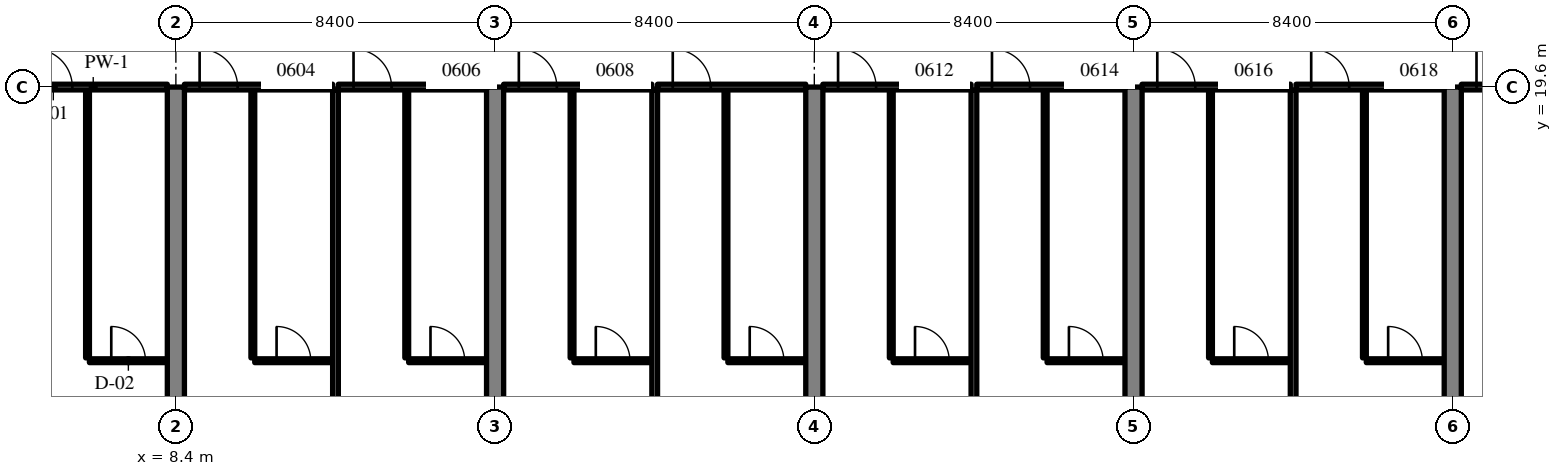
"""IFC4 building model, lengths in metres.
Left out: names, types, materials, properties, quantities, classifications, styles, units other than length and angle.
Written with IfcOpenShell. Run it as: python <this file> out.ifc"""

import sys

from ifc_helpers import new_model, si_unit, direction, frame, frame_2d, origin, place, context, subcontext, project, spatial, rectangle, extrude, source, transform, mapped, element, fill, save


model = new_model("IFC4")
c1 = context("Model", 3, precision=1e-05, world=origin(), true_north=direction((0.0, 1.0)))
c2 = subcontext(c1, "Body", "Model", "MODEL_VIEW")
j1 = project(units=[si_unit("LENGTHUNIT", "METRE"), si_unit("PLANEANGLEUNIT", "RADIAN")], contexts=[c1])
p1 = place(None, origin())
s1 = spatial("IfcSite", under=j1, at=p1, CompositionType="ELEMENT")
p2 = place(p1, origin())
s2 = spatial("IfcBuilding", under=s1, at=p2, CompositionType="ELEMENT")
p3 = place(p2, frame((0.0, 0.0, 31.6)))
s3 = spatial("IfcBuildingStorey", under=s2, at=p3, CompositionType="ELEMENT", Elevation=31.6)
m1 = source(origin(), c2, "Body", "SweptSolid", [
    extrude(rectangle(XDim=19.6, YDim=0.45, at=frame_2d((9.8, 0.0))), origin(), (0.0, 0.0, 1.0), 3.52),
])
for number, where, z_axis, x_axis in (
    (1, (8.4, 0.0, 0.0), (0.0, 0.0, 1.0), (0.0, 1.0, 0.0)),
    (2, (16.8, 0.0, 0.0), (0.0, 0.0, 1.0), (0.0, 1.0, 0.0)),
    (3, (25.2, 0.0, 0.0), (0.0, 0.0, 1.0), (0.0, 1.0, 0.0)),
    (4, (33.6, 0.0, 0.0), (0.0, 0.0, 1.0), (0.0, 1.0, 0.0)),
    (5, (42.0, 0.0, 0.0), (0.0, 0.0, 1.0), (0.0, 1.0, 0.0)),
):
    element("IfcWall", number, at=place(p3, frame(where, z_axis=z_axis, x_axis=x_axis)), inside=s3, PredefinedType="SHEAR", context=c2, shape_type="MappedRepresentation", body=[
        mapped(m1, transform((0.0, 0.0, 0.0), scale=1.0)),
    ])
m2 = source(origin(), c2, "Body", "SweptSolid", [
    extrude(rectangle(XDim=7.05, YDim=0.1, at=frame_2d((3.525, 0.0))), origin(), (0.0, 0.0, 1.0), 3.52),
])
p4 = place(p3, frame((6.075, 12.475, 0.0), z_axis=(0.0, 0.0, 1.0), x_axis=(0.0, 1.0, 0.0)))
e6 = element("IfcWall", 6, at=p4, inside=s3, PredefinedType="PARTITIONING", context=c2, shape_type="MappedRepresentation", body=[
    mapped(m2, transform((0.0, 0.0, 0.0), scale=1.0)),
])
m3 = source(origin(), c2, "Body", "SweptSolid", [
    extrude(rectangle(XDim=2.05, YDim=0.1, at=frame_2d((1.025, 0.0))), origin(), (0.0, 0.0, 1.0), 3.52),
])
p5 = place(p3, frame((6.125, 12.4, 0.0), z_axis=(0.0, 0.0, 1.0), x_axis=(1.0, 0.0, 0.0)))
e7 = element("IfcWall", 7, at=p5, inside=s3, PredefinedType="PARTITIONING", context=c2, shape_type="MappedRepresentation", body=[
    mapped(m3, transform((0.0, 0.0, 0.0), scale=1.0)),
])
m4 = source(origin(), c2, "Body", "SweptSolid", [
    extrude(rectangle(XDim=0.9, YDim=2.1, at=frame_2d((0.45, 1.05))), frame((0.0, 0.06, 0.0), z_axis=(0.0, -1.0, 0.0), x_axis=(1.0, 0.0, 0.0)), (0.0, 0.0, 1.0), 0.12),
])
p6 = place(p5, frame((0.575, 0.0, 0.0)))
e8 = element("IfcOpeningElement", 8, at=p6, cuts=e7, PredefinedType="OPENING", context=c2, shape_type="MappedRepresentation", body=[
    mapped(m4, transform((0.0, 0.0, 0.0), scale=1.0)),
])
m5 = source(origin(), c2, "Body", "SweptSolid", [
    extrude(rectangle(XDim=3.9, YDim=0.15, at=frame_2d((1.95, 0.0))), origin(), (0.0, 0.0, 1.0), 2.82),
])
p7 = place(p3, frame((4.275, 19.6, 0.0), z_axis=(0.0, 0.0, 1.0), x_axis=(1.0, 0.0, 0.0)))
e9 = element("IfcWall", 9, at=p7, inside=s3, PredefinedType="PARTITIONING", context=c2, shape_type="MappedRepresentation", body=[
    mapped(m5, transform((0.0, 0.0, 0.0), scale=1.0)),
])
m6 = source(origin(), c2, "Body", "SweptSolid", [
    extrude(rectangle(XDim=1.0, YDim=2.1, at=frame_2d((0.5, 1.05))), frame((0.0, 0.085, 0.0), z_axis=(0.0, -1.0, 0.0), x_axis=(1.0, 0.0, 0.0)), (0.0, 0.0, 1.0), 0.17),
])
p8 = place(p7, frame((0.4, 0.0, 0.0)))
e10 = element("IfcOpeningElement", 10, at=p8, cuts=e9, PredefinedType="OPENING", context=c2, shape_type="MappedRepresentation", body=[
    mapped(m6, transform((0.0, 0.0, 0.0), scale=1.0)),
])
p9 = place(p3, frame((10.425, 12.475, 0.0), z_axis=(0.0, 0.0, 1.0), x_axis=(0.0, 1.0, 0.0)))
e11 = element("IfcWall", 11, at=p9, inside=s3, PredefinedType="PARTITIONING", context=c2, shape_type="MappedRepresentation", body=[
    mapped(m2, transform((0.0, 0.0, 0.0), scale=1.0)),
])
m7 = source(origin(), c2, "Body", "SweptSolid", [
    extrude(rectangle(XDim=2.05, YDim=0.1, at=frame_2d((1.025, 0.0))), origin(), (0.0, 0.0, 1.0), 3.52),
])
p10 = place(p3, frame((10.475, 12.4, 0.0), z_axis=(0.0, 0.0, 1.0), x_axis=(1.0, 0.0, 0.0)))
e12 = element("IfcWall", 12, at=p10, inside=s3, PredefinedType="PARTITIONING", context=c2, shape_type="MappedRepresentation", body=[
    mapped(m7, transform((0.0, 0.0, 0.0), scale=1.0)),
])
p11 = place(p10, frame((0.575, 0.0, 0.0)))
e13 = element("IfcOpeningElement", 13, at=p11, cuts=e12, PredefinedType="OPENING", context=c2, shape_type="MappedRepresentation", body=[
    mapped(m4, transform((0.0, 0.0, 0.0), scale=1.0)),
])
m8 = source(origin(), c2, "Body", "SweptSolid", [
    extrude(rectangle(XDim=3.9, YDim=0.15, at=frame_2d((1.95, 0.0))), origin(), (0.0, 0.0, 1.0), 2.82),
])
p12 = place(p3, frame((8.625, 19.6, 0.0), z_axis=(0.0, 0.0, 1.0), x_axis=(1.0, 0.0, 0.0)))
e14 = element("IfcWall", 14, at=p12, inside=s3, PredefinedType="PARTITIONING", context=c2, shape_type="MappedRepresentation", body=[
    mapped(m8, transform((0.0, 0.0, 0.0), scale=1.0)),
])
p13 = place(p12, frame((0.4, 0.0, 0.0)))
e15 = element("IfcOpeningElement", 15, at=p13, cuts=e14, PredefinedType="OPENING", context=c2, shape_type="MappedRepresentation", body=[
    mapped(m6, transform((0.0, 0.0, 0.0), scale=1.0)),
])
p14 = place(p3, frame((14.475, 12.475, 0.0), z_axis=(0.0, 0.0, 1.0), x_axis=(0.0, 1.0, 0.0)))
e16 = element("IfcWall", 16, at=p14, inside=s3, PredefinedType="PARTITIONING", context=c2, shape_type="MappedRepresentation", body=[
    mapped(m2, transform((0.0, 0.0, 0.0), scale=1.0)),
])
p15 = place(p3, frame((14.525, 12.4, 0.0), z_axis=(0.0, 0.0, 1.0), x_axis=(1.0, 0.0, 0.0)))
e17 = element("IfcWall", 17, at=p15, inside=s3, PredefinedType="PARTITIONING", context=c2, shape_type="MappedRepresentation", body=[
    mapped(m3, transform((0.0, 0.0, 0.0), scale=1.0)),
])
p16 = place(p15, frame((0.575, 0.0, 0.0)))
e18 = element("IfcOpeningElement", 18, at=p16, cuts=e17, PredefinedType="OPENING", context=c2, shape_type="MappedRepresentation", body=[
    mapped(m4, transform((0.0, 0.0, 0.0), scale=1.0)),
])
p17 = place(p3, frame((12.675, 19.6, 0.0), z_axis=(0.0, 0.0, 1.0), x_axis=(1.0, 0.0, 0.0)))
e19 = element("IfcWall", 19, at=p17, inside=s3, PredefinedType="PARTITIONING", context=c2, shape_type="MappedRepresentation", body=[
    mapped(m8, transform((0.0, 0.0, 0.0), scale=1.0)),
])
p18 = place(p17, frame((0.4, 0.0, 0.0)))
e20 = element("IfcOpeningElement", 20, at=p18, cuts=e19, PredefinedType="OPENING", context=c2, shape_type="MappedRepresentation", body=[
    mapped(m6, transform((0.0, 0.0, 0.0), scale=1.0)),
])
m9 = source(origin(), c2, "Body", "SweptSolid", [
    extrude(rectangle(XDim=18.625, YDim=0.15, at=frame_2d((9.312, 0.0))), origin(), (0.0, 0.0, 1.0), 3.52),
])
p19 = place(p3, frame((12.6, 0.9, 0.0), z_axis=(0.0, 0.0, 1.0), x_axis=(0.0, 1.0, 0.0)))
e21 = element("IfcWall", 21, at=p19, inside=s3, PredefinedType="PARTITIONING", context=c2, shape_type="MappedRepresentation", body=[
    mapped(m9, transform((0.0, 0.0, 0.0), scale=1.0)),
])
p20 = place(p3, frame((18.825, 12.475, 0.0), z_axis=(0.0, 0.0, 1.0), x_axis=(0.0, 1.0, 0.0)))
e22 = element("IfcWall", 22, at=p20, inside=s3, PredefinedType="PARTITIONING", context=c2, shape_type="MappedRepresentation", body=[
    mapped(m2, transform((0.0, 0.0, 0.0), scale=1.0)),
])
p21 = place(p3, frame((18.875, 12.4, 0.0), z_axis=(0.0, 0.0, 1.0), x_axis=(1.0, 0.0, 0.0)))
e23 = element("IfcWall", 23, at=p21, inside=s3, PredefinedType="PARTITIONING", context=c2, shape_type="MappedRepresentation", body=[
    mapped(m3, transform((0.0, 0.0, 0.0), scale=1.0)),
])
p22 = place(p21, frame((0.575, 0.0, 0.0)))
e24 = element("IfcOpeningElement", 24, at=p22, cuts=e23, PredefinedType="OPENING", context=c2, shape_type="MappedRepresentation", body=[
    mapped(m4, transform((0.0, 0.0, 0.0), scale=1.0)),
])
p23 = place(p3, frame((17.025, 19.6, 0.0), z_axis=(0.0, 0.0, 1.0), x_axis=(1.0, 0.0, 0.0)))
e25 = element("IfcWall", 25, at=p23, inside=s3, PredefinedType="PARTITIONING", context=c2, shape_type="MappedRepresentation", body=[
    mapped(m5, transform((0.0, 0.0, 0.0), scale=1.0)),
])
p24 = place(p23, frame((0.4, 0.0, 0.0)))
e26 = element("IfcOpeningElement", 26, at=p24, cuts=e25, PredefinedType="OPENING", context=c2, shape_type="MappedRepresentation", body=[
    mapped(m6, transform((0.0, 0.0, 0.0), scale=1.0)),
])
p25 = place(p3, frame((22.875, 12.475, 0.0), z_axis=(0.0, 0.0, 1.0), x_axis=(0.0, 1.0, 0.0)))
e27 = element("IfcWall", 27, at=p25, inside=s3, PredefinedType="PARTITIONING", context=c2, shape_type="MappedRepresentation", body=[
    mapped(m2, transform((0.0, 0.0, 0.0), scale=1.0)),
])
p26 = place(p3, frame((22.925, 12.4, 0.0), z_axis=(0.0, 0.0, 1.0), x_axis=(1.0, 0.0, 0.0)))
e28 = element("IfcWall", 28, at=p26, inside=s3, PredefinedType="PARTITIONING", context=c2, shape_type="MappedRepresentation", body=[
    mapped(m3, transform((0.0, 0.0, 0.0), scale=1.0)),
])
p27 = place(p26, frame((0.575, 0.0, 0.0)))
e29 = element("IfcOpeningElement", 29, at=p27, cuts=e28, PredefinedType="OPENING", context=c2, shape_type="MappedRepresentation", body=[
    mapped(m4, transform((0.0, 0.0, 0.0), scale=1.0)),
])
p28 = place(p3, frame((21.075, 19.6, 0.0), z_axis=(0.0, 0.0, 1.0), x_axis=(1.0, 0.0, 0.0)))
e30 = element("IfcWall", 30, at=p28, inside=s3, PredefinedType="PARTITIONING", context=c2, shape_type="MappedRepresentation", body=[
    mapped(m5, transform((0.0, 0.0, 0.0), scale=1.0)),
])
p29 = place(p28, frame((0.4, 0.0, 0.0)))
e31 = element("IfcOpeningElement", 31, at=p29, cuts=e30, PredefinedType="OPENING", context=c2, shape_type="MappedRepresentation", body=[
    mapped(m6, transform((0.0, 0.0, 0.0), scale=1.0)),
])
p30 = place(p3, frame((21.0, 0.9, 0.0), z_axis=(0.0, 0.0, 1.0), x_axis=(0.0, 1.0, 0.0)))
e32 = element("IfcWall", 32, at=p30, inside=s3, PredefinedType="PARTITIONING", context=c2, shape_type="MappedRepresentation", body=[
    mapped(m9, transform((0.0, 0.0, 0.0), scale=1.0)),
])
p31 = place(p3, frame((27.225, 12.475, 0.0), z_axis=(0.0, 0.0, 1.0), x_axis=(0.0, 1.0, 0.0)))
e33 = element("IfcWall", 33, at=p31, inside=s3, PredefinedType="PARTITIONING", context=c2, shape_type="MappedRepresentation", body=[
    mapped(m2, transform((0.0, 0.0, 0.0), scale=1.0)),
])
p32 = place(p3, frame((27.275, 12.4, 0.0), z_axis=(0.0, 0.0, 1.0), x_axis=(1.0, 0.0, 0.0)))
e34 = element("IfcWall", 34, at=p32, inside=s3, PredefinedType="PARTITIONING", context=c2, shape_type="MappedRepresentation", body=[
    mapped(m3, transform((0.0, 0.0, 0.0), scale=1.0)),
])
p33 = place(p32, frame((0.575, 0.0, 0.0)))
e35 = element("IfcOpeningElement", 35, at=p33, cuts=e34, PredefinedType="OPENING", context=c2, shape_type="MappedRepresentation", body=[
    mapped(m4, transform((0.0, 0.0, 0.0), scale=1.0)),
])
p34 = place(p3, frame((25.425, 19.6, 0.0), z_axis=(0.0, 0.0, 1.0), x_axis=(1.0, 0.0, 0.0)))
e36 = element("IfcWall", 36, at=p34, inside=s3, PredefinedType="PARTITIONING", context=c2, shape_type="MappedRepresentation", body=[
    mapped(m8, transform((0.0, 0.0, 0.0), scale=1.0)),
])
p35 = place(p34, frame((0.4, 0.0, 0.0)))
e37 = element("IfcOpeningElement", 37, at=p35, cuts=e36, PredefinedType="OPENING", context=c2, shape_type="MappedRepresentation", body=[
    mapped(m6, transform((0.0, 0.0, 0.0), scale=1.0)),
])
p36 = place(p3, frame((31.275, 12.475, 0.0), z_axis=(0.0, 0.0, 1.0), x_axis=(0.0, 1.0, 0.0)))
e38 = element("IfcWall", 38, at=p36, inside=s3, PredefinedType="PARTITIONING", context=c2, shape_type="MappedRepresentation", body=[
    mapped(m2, transform((0.0, 0.0, 0.0), scale=1.0)),
])
p37 = place(p3, frame((31.325, 12.4, 0.0), z_axis=(0.0, 0.0, 1.0), x_axis=(1.0, 0.0, 0.0)))
e39 = element("IfcWall", 39, at=p37, inside=s3, PredefinedType="PARTITIONING", context=c2, shape_type="MappedRepresentation", body=[
    mapped(m3, transform((0.0, 0.0, 0.0), scale=1.0)),
])
p38 = place(p37, frame((0.575, 0.0, 0.0)))
e40 = element("IfcOpeningElement", 40, at=p38, cuts=e39, PredefinedType="OPENING", context=c2, shape_type="MappedRepresentation", body=[
    mapped(m4, transform((0.0, 0.0, 0.0), scale=1.0)),
])
p39 = place(p3, frame((29.475, 19.6, 0.0), z_axis=(0.0, 0.0, 1.0), x_axis=(1.0, 0.0, 0.0)))
e41 = element("IfcWall", 41, at=p39, inside=s3, PredefinedType="PARTITIONING", context=c2, shape_type="MappedRepresentation", body=[
    mapped(m8, transform((0.0, 0.0, 0.0), scale=1.0)),
])
p40 = place(p39, frame((0.4, 0.0, 0.0)))
e42 = element("IfcOpeningElement", 42, at=p40, cuts=e41, PredefinedType="OPENING", context=c2, shape_type="MappedRepresentation", body=[
    mapped(m6, transform((0.0, 0.0, 0.0), scale=1.0)),
])
p41 = place(p3, frame((29.4, 0.9, 0.0), z_axis=(0.0, 0.0, 1.0), x_axis=(0.0, 1.0, 0.0)))
e43 = element("IfcWall", 43, at=p41, inside=s3, PredefinedType="PARTITIONING", context=c2, shape_type="MappedRepresentation", body=[
    mapped(m9, transform((0.0, 0.0, 0.0), scale=1.0)),
])
p42 = place(p3, frame((35.625, 12.475, 0.0), z_axis=(0.0, 0.0, 1.0), x_axis=(0.0, 1.0, 0.0)))
e44 = element("IfcWall", 44, at=p42, inside=s3, PredefinedType="PARTITIONING", context=c2, shape_type="MappedRepresentation", body=[
    mapped(m2, transform((0.0, 0.0, 0.0), scale=1.0)),
])
p43 = place(p3, frame((35.675, 12.4, 0.0), z_axis=(0.0, 0.0, 1.0), x_axis=(1.0, 0.0, 0.0)))
e45 = element("IfcWall", 45, at=p43, inside=s3, PredefinedType="PARTITIONING", context=c2, shape_type="MappedRepresentation", body=[
    mapped(m3, transform((0.0, 0.0, 0.0), scale=1.0)),
])
p44 = place(p43, frame((0.575, 0.0, 0.0)))
e46 = element("IfcOpeningElement", 46, at=p44, cuts=e45, PredefinedType="OPENING", context=c2, shape_type="MappedRepresentation", body=[
    mapped(m4, transform((0.0, 0.0, 0.0), scale=1.0)),
])
p45 = place(p3, frame((33.825, 19.6, 0.0), z_axis=(0.0, 0.0, 1.0), x_axis=(1.0, 0.0, 0.0)))
e47 = element("IfcWall", 47, at=p45, inside=s3, PredefinedType="PARTITIONING", context=c2, shape_type="MappedRepresentation", body=[
    mapped(m5, transform((0.0, 0.0, 0.0), scale=1.0)),
])
p46 = place(p45, frame((0.4, 0.0, 0.0)))
e48 = element("IfcOpeningElement", 48, at=p46, cuts=e47, PredefinedType="OPENING", context=c2, shape_type="MappedRepresentation", body=[
    mapped(m6, transform((0.0, 0.0, 0.0), scale=1.0)),
])
p47 = place(p3, frame((39.675, 12.475, 0.0), z_axis=(0.0, 0.0, 1.0), x_axis=(0.0, 1.0, 0.0)))
e49 = element("IfcWall", 49, at=p47, inside=s3, PredefinedType="PARTITIONING", context=c2, shape_type="MappedRepresentation", body=[
    mapped(m2, transform((0.0, 0.0, 0.0), scale=1.0)),
])
p48 = place(p3, frame((39.725, 12.4, 0.0), z_axis=(0.0, 0.0, 1.0), x_axis=(1.0, 0.0, 0.0)))
e50 = element("IfcWall", 50, at=p48, inside=s3, PredefinedType="PARTITIONING", context=c2, shape_type="MappedRepresentation", body=[
    mapped(m7, transform((0.0, 0.0, 0.0), scale=1.0)),
])
p49 = place(p48, frame((0.575, 0.0, 0.0)))
e51 = element("IfcOpeningElement", 51, at=p49, cuts=e50, PredefinedType="OPENING", context=c2, shape_type="MappedRepresentation", body=[
    mapped(m4, transform((0.0, 0.0, 0.0), scale=1.0)),
])
p50 = place(p3, frame((37.875, 19.6, 0.0), z_axis=(0.0, 0.0, 1.0), x_axis=(1.0, 0.0, 0.0)))
e52 = element("IfcWall", 52, at=p50, inside=s3, PredefinedType="PARTITIONING", context=c2, shape_type="MappedRepresentation", body=[
    mapped(m8, transform((0.0, 0.0, 0.0), scale=1.0)),
])
p51 = place(p50, frame((0.4, 0.0, 0.0)))
e53 = element("IfcOpeningElement", 53, at=p51, cuts=e52, PredefinedType="OPENING", context=c2, shape_type="MappedRepresentation", body=[
    mapped(m6, transform((0.0, 0.0, 0.0), scale=1.0)),
])
m10 = source(origin(), c2, "Body", "SweptSolid", [
    extrude(rectangle(XDim=20.998, YDim=0.15, at=frame_2d((10.499, 0.0))), origin(), (0.0, 0.0, 1.0), 3.52),
])
p52 = place(p3, frame((37.8, -1.473, 0.0), z_axis=(0.0, 0.0, 1.0), x_axis=(0.0, 1.0, 0.0)))
e54 = element("IfcWall", 54, at=p52, inside=s3, PredefinedType="PARTITIONING", context=c2, shape_type="MappedRepresentation", body=[
    mapped(m10, transform((0.0, 0.0, 0.0), scale=1.0)),
])
p53 = place(p3, frame((42.225, 19.6, 0.0), z_axis=(0.0, 0.0, 1.0), x_axis=(1.0, 0.0, 0.0)))
e55 = element("IfcWall", 55, at=p53, inside=s3, PredefinedType="PARTITIONING", context=c2, shape_type="MappedRepresentation", body=[
    mapped(m8, transform((0.0, 0.0, 0.0), scale=1.0)),
])
p54 = place(p53, frame((0.4, 0.0, 0.0)))
e56 = element("IfcOpeningElement", 56, at=p54, cuts=e55, PredefinedType="OPENING", context=c2, shape_type="MappedRepresentation", body=[
    mapped(m6, transform((0.0, 0.0, 0.0), scale=1.0)),
])
m11 = source(origin(), c2, "Body", "SweptSolid", [
    extrude(rectangle(XDim=0.9, YDim=2.1, at=frame_2d((0.45, 1.05))), frame((0.0, 0.025, 0.0), z_axis=(0.0, -1.0, 0.0), x_axis=(1.0, 0.0, 0.0)), (0.0, 0.0, 1.0), 0.05),
])
p55 = place(p6, origin())
e57 = element("IfcDoor", 57, at=p55, inside=s3, OperationType="SINGLE_SWING_LEFT", PredefinedType="DOOR", context=c2, shape_type="MappedRepresentation", body=[
    mapped(m11, transform((0.0, 0.0, 0.0), scale=1.0)),
])
fill(e8, e57)
m12 = source(origin(), c2, "Body", "SweptSolid", [
    extrude(rectangle(XDim=1.0, YDim=2.1, at=frame_2d((0.5, 1.05))), frame((0.0, 0.025, 0.0), z_axis=(0.0, -1.0, 0.0), x_axis=(1.0, 0.0, 0.0)), (0.0, 0.0, 1.0), 0.05),
])
p56 = place(p8, origin())
e58 = element("IfcDoor", 58, at=p56, inside=s3, OperationType="SINGLE_SWING_LEFT", PredefinedType="DOOR", context=c2, shape_type="MappedRepresentation", body=[
    mapped(m12, transform((0.0, 0.0, 0.0), scale=1.0)),
])
fill(e10, e58)
p57 = place(p11, origin())
e59 = element("IfcDoor", 59, at=p57, inside=s3, OperationType="SINGLE_SWING_LEFT", PredefinedType="DOOR", context=c2, shape_type="MappedRepresentation", body=[
    mapped(m11, transform((0.0, 0.0, 0.0), scale=1.0)),
])
fill(e13, e59)
p58 = place(p13, origin())
e60 = element("IfcDoor", 60, at=p58, inside=s3, OperationType="SINGLE_SWING_LEFT", PredefinedType="DOOR", context=c2, shape_type="MappedRepresentation", body=[
    mapped(m12, transform((0.0, 0.0, 0.0), scale=1.0)),
])
fill(e15, e60)
p59 = place(p16, origin())
e61 = element("IfcDoor", 61, at=p59, inside=s3, OperationType="SINGLE_SWING_LEFT", PredefinedType="DOOR", context=c2, shape_type="MappedRepresentation", body=[
    mapped(m11, transform((0.0, 0.0, 0.0), scale=1.0)),
])
fill(e18, e61)
p60 = place(p18, origin())
e62 = element("IfcDoor", 62, at=p60, inside=s3, OperationType="SINGLE_SWING_LEFT", PredefinedType="DOOR", context=c2, shape_type="MappedRepresentation", body=[
    mapped(m12, transform((0.0, 0.0, 0.0), scale=1.0)),
])
fill(e20, e62)
p61 = place(p22, origin())
e63 = element("IfcDoor", 63, at=p61, inside=s3, OperationType="SINGLE_SWING_LEFT", PredefinedType="DOOR", context=c2, shape_type="MappedRepresentation", body=[
    mapped(m11, transform((0.0, 0.0, 0.0), scale=1.0)),
])
fill(e24, e63)
p62 = place(p24, origin())
e64 = element("IfcDoor", 64, at=p62, inside=s3, OperationType="SINGLE_SWING_LEFT", PredefinedType="DOOR", context=c2, shape_type="MappedRepresentation", body=[
    mapped(m12, transform((0.0, 0.0, 0.0), scale=1.0)),
])
fill(e26, e64)
p63 = place(p27, origin())
e65 = element("IfcDoor", 65, at=p63, inside=s3, OperationType="SINGLE_SWING_LEFT", PredefinedType="DOOR", context=c2, shape_type="MappedRepresentation", body=[
    mapped(m11, transform((0.0, 0.0, 0.0), scale=1.0)),
])
fill(e29, e65)
p64 = place(p29, origin())
e66 = element("IfcDoor", 66, at=p64, inside=s3, OperationType="SINGLE_SWING_LEFT", PredefinedType="DOOR", context=c2, shape_type="MappedRepresentation", body=[
    mapped(m12, transform((0.0, 0.0, 0.0), scale=1.0)),
])
fill(e31, e66)
p65 = place(p33, origin())
e67 = element("IfcDoor", 67, at=p65, inside=s3, OperationType="SINGLE_SWING_LEFT", PredefinedType="DOOR", context=c2, shape_type="MappedRepresentation", body=[
    mapped(m11, transform((0.0, 0.0, 0.0), scale=1.0)),
])
fill(e35, e67)
p66 = place(p35, origin())
e68 = element("IfcDoor", 68, at=p66, inside=s3, OperationType="SINGLE_SWING_LEFT", PredefinedType="DOOR", context=c2, shape_type="MappedRepresentation", body=[
    mapped(m12, transform((0.0, 0.0, 0.0), scale=1.0)),
])
fill(e37, e68)
p67 = place(p38, origin())
e69 = element("IfcDoor", 69, at=p67, inside=s3, OperationType="SINGLE_SWING_LEFT", PredefinedType="DOOR", context=c2, shape_type="MappedRepresentation", body=[
    mapped(m11, transform((0.0, 0.0, 0.0), scale=1.0)),
])
fill(e40, e69)
p68 = place(p40, origin())
e70 = element("IfcDoor", 70, at=p68, inside=s3, OperationType="SINGLE_SWING_LEFT", PredefinedType="DOOR", context=c2, shape_type="MappedRepresentation", body=[
    mapped(m12, transform((0.0, 0.0, 0.0), scale=1.0)),
])
fill(e42, e70)
p69 = place(p44, origin())
e71 = element("IfcDoor", 71, at=p69, inside=s3, OperationType="SINGLE_SWING_LEFT", PredefinedType="DOOR", context=c2, shape_type="MappedRepresentation", body=[
    mapped(m11, transform((0.0, 0.0, 0.0), scale=1.0)),
])
fill(e46, e71)
p70 = place(p46, origin())
e72 = element("IfcDoor", 72, at=p70, inside=s3, OperationType="SINGLE_SWING_LEFT", PredefinedType="DOOR", context=c2, shape_type="MappedRepresentation", body=[
    mapped(m12, transform((0.0, 0.0, 0.0), scale=1.0)),
])
fill(e48, e72)
p71 = place(p49, origin())
e73 = element("IfcDoor", 73, at=p71, inside=s3, OperationType="SINGLE_SWING_LEFT", PredefinedType="DOOR", context=c2, shape_type="MappedRepresentation", body=[
    mapped(m11, transform((0.0, 0.0, 0.0), scale=1.0)),
])
fill(e51, e73)
p72 = place(p51, origin())
e74 = element("IfcDoor", 74, at=p72, inside=s3, OperationType="SINGLE_SWING_LEFT", PredefinedType="DOOR", context=c2, shape_type="MappedRepresentation", body=[
    mapped(m12, transform((0.0, 0.0, 0.0), scale=1.0)),
])
fill(e53, e74)
p73 = place(p54, origin())
e75 = element("IfcDoor", 75, at=p73, inside=s3, OperationType="SINGLE_SWING_LEFT", PredefinedType="DOOR", context=c2, shape_type="MappedRepresentation", body=[
    mapped(m12, transform((0.0, 0.0, 0.0), scale=1.0)),
])
fill(e56, e75)
save(model, sys.argv[1])
